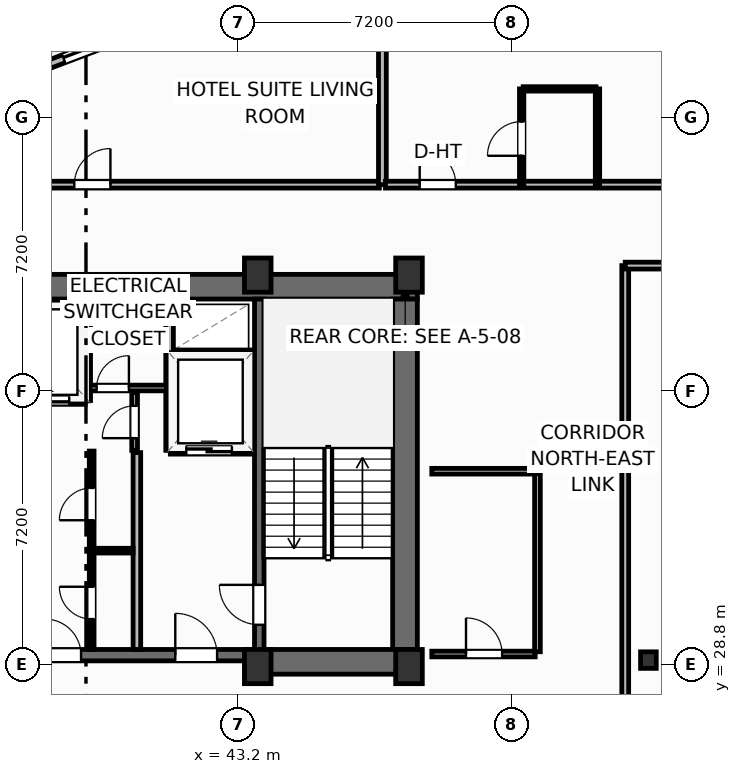
"""IFC4 building model, lengths in metres.
Left out: names, types, materials, properties, quantities, classifications, styles, units other than length and angle.
Written with IfcOpenShell. Run it as: python <this file> out.ifc"""

import sys

from ifc_helpers import new_model, si_unit, direction, frame, frame_2d, origin, origin_2d, place, context, subcontext, project, spatial, rectangle, i_section, extrude, element, fill, save


model = new_model("IFC4")
c1 = context("Model", 3, precision=1e-05, world=origin(), true_north=direction((0.0, 1.0)))
c2 = subcontext(c1, "Body", "Model", "MODEL_VIEW")
j1 = project(units=[si_unit("LENGTHUNIT", "METRE"), si_unit("PLANEANGLEUNIT", "RADIAN")], contexts=[c1])
p1 = place(None, origin())
s1 = spatial("IfcSite", under=j1, at=p1, CompositionType="ELEMENT")
p2 = place(p1, origin())
s2 = spatial("IfcBuilding", under=s1, at=p2, CompositionType="ELEMENT")
p3 = place(p2, frame((0.0, 0.0, 212.7)))
s3 = spatial("IfcBuildingStorey", under=s2, at=p3, CompositionType="ELEMENT", Elevation=212.7)
for number, where, z_axis, x_axis in (
    (1, (43.72, 28.75, 0.0), (0.0, 0.0, 1.0), (1.0, 0.0, 0.0)),
    (2, (47.7, 28.75, 0.0), (0.0, 0.0, 1.0), (1.0, 0.0, 0.0)),
    (3, (43.72, 39.05, 0.0), (0.0, 0.0, 1.0), (1.0, 0.0, 0.0)),
    (4, (47.7, 39.05, 0.0), (0.0, 0.0, 1.0), (1.0, 0.0, 0.0)),
):
    element("IfcColumn", number, at=place(p3, frame(where, z_axis=z_axis, x_axis=x_axis)), inside=s3, PredefinedType="COLUMN", context=c2, shape_type="SweptSolid", body=[
        extrude(rectangle(XDim=0.7, YDim=0.9, at=origin_2d()), origin(), (0.0, 0.0, 1.0), 3.7),
    ])
p4 = place(p3, frame((54.0, 28.92, 0.0), z_axis=(0.0, 0.0, 1.0), x_axis=(1.0, 0.0, 0.0)))
e5 = element("IfcColumn", 5, at=p4, inside=s3, PredefinedType="COLUMN", context=c2, shape_type="SweptSolid", body=[
    extrude(i_section(OverallWidth=0.412, OverallDepth=0.435, WebThickness=0.036, FlangeThickness=0.057, FilletRadius=0.025, at=origin_2d()), origin(), (0.0, 0.0, 1.0), 3.7),
])
p5 = place(p3, frame((30.48, 38.745, 0.0), z_axis=(0.0, 0.0, 1.0), x_axis=(1.0, 0.0, 0.0)))
e6 = element("IfcWall", 6, at=p5, inside=s3, PredefinedType="SHEAR", context=c2, shape_type="SweptSolid", body=[
    extrude(rectangle(XDim=17.44, YDim=0.65, at=frame_2d((8.72, 0.0))), origin(), (0.0, 0.0, 1.0), 3.45),
])
p6 = place(p3, frame((47.595, 29.2, 0.0), z_axis=(0.0, 0.0, 1.0), x_axis=(0.0, 1.0, 0.0)))
e7 = element("IfcWall", 7, at=p6, inside=s3, PredefinedType="SHEAR", context=c2, shape_type="SweptSolid", body=[
    extrude(rectangle(XDim=9.22, YDim=0.65, at=frame_2d((4.61, 0.0))), origin(), (0.0, 0.0, 1.0), 3.45),
])
p7 = place(p3, frame((43.6, 28.875, 0.0), z_axis=(0.0, 0.0, 1.0), x_axis=(1.0, 0.0, 0.0)))
e8 = element("IfcWall", 8, at=p7, inside=s3, PredefinedType="SHEAR", context=c2, shape_type="SweptSolid", body=[
    extrude(rectangle(XDim=4.32, YDim=0.65, at=frame_2d((2.16, 0.0))), origin(), (0.0, 0.0, 1.0), 3.45),
])
p8 = place(p3, frame((34.8, 29.05, 0.0), z_axis=(0.0, 0.0, 1.0), x_axis=(1.0, 0.0, 0.0)))
e9 = element("IfcWall", 9, at=p8, inside=s3, PredefinedType="SHEAR", context=c2, shape_type="SweptSolid", body=[
    extrude(rectangle(XDim=8.8, YDim=0.3, at=frame_2d((4.4, 0.0))), origin(), (0.0, 0.0, 1.0), 3.45),
])
p9 = place(p8, frame((0.95, 0.0, 0.0)))
e10 = element("IfcOpeningElement", 10, at=p9, cuts=e9, PredefinedType="OPENING", context=c2, shape_type="SweptSolid", body=[
    extrude(rectangle(XDim=1.1, YDim=2.15, at=frame_2d((0.55, 1.075))), frame((0.0, 0.16, 0.0), z_axis=(0.0, -1.0, 0.0), x_axis=(1.0, 0.0, 0.0)), (0.0, 0.0, 1.0), 0.32),
])
p10 = place(p8, frame((6.75, 0.0, 0.0)))
e11 = element("IfcOpeningElement", 11, at=p10, cuts=e9, PredefinedType="OPENING", context=c2, shape_type="SweptSolid", body=[
    extrude(rectangle(XDim=1.1, YDim=2.15, at=frame_2d((0.55, 1.075))), frame((0.0, 0.16, 0.0), z_axis=(0.0, -1.0, 0.0), x_axis=(1.0, 0.0, 0.0)), (0.0, 0.0, 1.0), 0.32),
])
p11 = place(p8, frame((3.32, 0.0, 0.0)))
e12 = element("IfcOpeningElement", 12, at=p11, cuts=e9, PredefinedType="OPENING", context=c2, shape_type="SweptSolid", body=[
    extrude(rectangle(XDim=0.95, YDim=2.15, at=frame_2d((0.475, 1.075))), frame((0.0, 0.16, 0.0), z_axis=(0.0, -1.0, 0.0), x_axis=(1.0, 0.0, 0.0)), (0.0, 0.0, 1.0), 0.32),
])
p12 = place(p3, frame((43.76, 29.2, 0.0), z_axis=(0.0, 0.0, 1.0), x_axis=(0.0, 1.0, 0.0)))
e13 = element("IfcWall", 13, at=p12, inside=s3, PredefinedType="SHEAR", context=c2, shape_type="SweptSolid", body=[
    extrude(rectangle(XDim=9.22, YDim=0.25, at=frame_2d((4.61, 0.0))), origin(), (0.0, 0.0, 1.0), 3.45),
])
p13 = place(p12, frame((0.65, 0.0, 0.0)))
e14 = element("IfcOpeningElement", 14, at=p13, cuts=e13, PredefinedType="OPENING", context=c2, shape_type="SweptSolid", body=[
    extrude(rectangle(XDim=1.05, YDim=2.15, at=frame_2d((0.525, 1.075))), frame((0.0, 0.135, 0.0), z_axis=(0.0, -1.0, 0.0), x_axis=(1.0, 0.0, 0.0)), (0.0, 0.0, 1.0), 0.27),
])
p14 = place(p3, frame((36.617, 43.986, 0.0), z_axis=(0.0, 0.0, 1.0), x_axis=(0.935227640088, 0.354046976001, 0.0)))
e15 = element("IfcWall", 15, at=p14, inside=s3, PredefinedType="SOLIDWALL", context=c2, shape_type="SweptSolid", body=[
    extrude(rectangle(XDim=6.0, YDim=0.22, at=frame_2d((3.0, 0.0))), origin(), (0.0, 0.0, 1.0), 2.73),
])
p15 = place(p14, frame((2.136, 0.0, 0.0)))
e16 = element("IfcOpeningElement", 16, at=p15, cuts=e15, PredefinedType="OPENING", context=c2, shape_type="SweptSolid", body=[
    extrude(rectangle(XDim=2.1, YDim=2.3, at=frame_2d((1.05, 1.15))), frame((0.0, 0.12, 0.0), z_axis=(0.0, -1.0, 0.0), x_axis=(1.0, 0.0, 0.0)), (0.0, 0.0, 1.0), 0.24),
])
p16 = place(p3, frame((35.58, 41.43, 0.0), z_axis=(0.0, 0.0, 1.0), x_axis=(1.0, 0.0, 0.0)))
e17 = element("IfcWall", 17, at=p16, inside=s3, PredefinedType="PARTITIONING", context=c2, shape_type="SweptSolid", body=[
    extrude(rectangle(XDim=11.34, YDim=0.18, at=frame_2d((5.67, 0.0))), origin(), (0.0, 0.0, 1.0), 3.018),
])
p17 = place(p16, frame((3.313, 0.0, 0.0)))
e18 = element("IfcOpeningElement", 18, at=p17, cuts=e17, PredefinedType="OPENING", context=c2, shape_type="SweptSolid", body=[
    extrude(rectangle(XDim=0.95, YDim=2.15, at=frame_2d((0.475, 1.075))), frame((0.0, 0.1, 0.0), z_axis=(0.0, -1.0, 0.0), x_axis=(1.0, 0.0, 0.0)), (0.0, 0.0, 1.0), 0.2),
])
p18 = place(p3, frame((47.0, 41.43, 0.0), z_axis=(0.0, 0.0, 1.0), x_axis=(0.0, 1.0, 0.0)))
e19 = element("IfcWall", 19, at=p18, inside=s3, PredefinedType="PARTITIONING", context=c2, shape_type="SweptSolid", body=[
    extrude(rectangle(XDim=8.7, YDim=0.205, at=frame_2d((4.35, 0.0))), origin(), (0.0, 0.0, 1.0), 3.45),
])
p19 = place(p3, frame((47.08, 41.43, 0.0), z_axis=(0.0, 0.0, 1.0), x_axis=(1.0, 0.0, 0.0)))
e20 = element("IfcWall", 20, at=p19, inside=s3, PredefinedType="PARTITIONING", context=c2, shape_type="SweptSolid", body=[
    extrude(rectangle(XDim=21.216, YDim=0.18, at=frame_2d((10.608, 0.0))), origin(), (0.0, 0.0, 1.0), 3.45),
])
p20 = place(p19, frame((0.902, 0.0, 0.0)))
e21 = element("IfcOpeningElement", 21, at=p20, cuts=e20, PredefinedType="OPENING", context=c2, shape_type="SweptSolid", body=[
    extrude(rectangle(XDim=0.95, YDim=2.15, at=frame_2d((0.475, 1.075))), frame((0.0, 0.1, 0.0), z_axis=(0.0, -1.0, 0.0), x_axis=(1.0, 0.0, 0.0)), (0.0, 0.0, 1.0), 0.2),
])
p21 = place(p3, frame((50.705, 43.95, 0.0), z_axis=(0.0, 0.0, 1.0), x_axis=(1.0, 0.0, 0.0)))
e22 = element("IfcWall", 22, at=p21, inside=s3, PredefinedType="PARTITIONING", context=c2, shape_type="SweptSolid", body=[
    extrude(rectangle(XDim=1.915, YDim=0.115, at=frame_2d((0.958, 0.0))), origin(), (0.0, 0.0, 1.0), 3.45),
])
p22 = place(p3, frame((50.665, 41.43, 0.0), z_axis=(0.0, 0.0, 1.0), x_axis=(0.0, 1.0, 0.0)))
e23 = element("IfcWall", 23, at=p22, inside=s3, PredefinedType="PARTITIONING", context=c2, shape_type="SweptSolid", body=[
    extrude(rectangle(XDim=2.52, YDim=0.115, at=frame_2d((1.26, 0.0))), origin(), (0.0, 0.0, 1.0), 3.45),
])
p23 = place(p22, frame((0.76, 0.0, 0.0)))
e24 = element("IfcOpeningElement", 24, at=p23, cuts=e23, PredefinedType="OPENING", context=c2, shape_type="SweptSolid", body=[
    extrude(rectangle(XDim=0.9, YDim=2.05, at=frame_2d((0.45, 1.025))), frame((0.0, 0.067, 0.0), z_axis=(0.0, -1.0, 0.0), x_axis=(1.0, 0.0, 0.0)), (0.0, 0.0, 1.0), 0.135),
])
p24 = place(p3, frame((52.66, 41.43, 0.0), z_axis=(0.0, 0.0, 1.0), x_axis=(0.0, 1.0, 0.0)))
e25 = element("IfcWall", 25, at=p24, inside=s3, PredefinedType="PARTITIONING", context=c2, shape_type="SweptSolid", body=[
    extrude(rectangle(XDim=2.52, YDim=0.115, at=frame_2d((1.26, 0.0))), origin(), (0.0, 0.0, 1.0), 3.45),
])
p25 = place(p3, frame((53.39, 19.24, 0.0), z_axis=(0.0, 0.0, 1.0), x_axis=(0.0, 1.0, 0.0)))
e26 = element("IfcWall", 26, at=p25, inside=s3, PredefinedType="PARTITIONING", context=c2, shape_type="SweptSolid", body=[
    extrude(rectangle(XDim=20.06, YDim=0.18, at=frame_2d((10.03, 0.0))), origin(), (0.0, 0.0, 1.0), 3.45),
])
p26 = place(p25, frame((7.7, 0.0, 0.0)))
e27 = element("IfcOpeningElement", 27, at=p26, cuts=e26, PredefinedType="OPENING", context=c2, shape_type="SweptSolid", body=[
    extrude(rectangle(XDim=0.95, YDim=2.05, at=frame_2d((0.475, 1.025))), frame((0.0, 0.1, 0.0), z_axis=(0.0, -1.0, 0.0), x_axis=(1.0, 0.0, 0.0)), (0.0, 0.0, 1.0), 0.2),
])
p27 = place(p3, frame((53.39, 39.3, 0.0), z_axis=(0.0, 0.0, 1.0), x_axis=(1.0, 0.0, 0.0)))
e28 = element("IfcWall", 28, at=p27, inside=s3, PredefinedType="PARTITIONING", context=c2, shape_type="SweptSolid", body=[
    extrude(rectangle(XDim=15.713, YDim=0.18, at=frame_2d((7.856, 0.0))), origin(), (0.0, 0.0, 1.0), 3.45),
])
p28 = place(p3, frame((40.54, 29.2, 0.0), z_axis=(0.0, 0.0, 1.0), x_axis=(0.0, 1.0, 0.0)))
e29 = element("IfcWall", 29, at=p28, inside=s3, PredefinedType="PARTITIONING", context=c2, shape_type="SweptSolid", body=[
    extrude(rectangle(XDim=5.18, YDim=0.2, at=frame_2d((2.59, 0.0))), origin(), (0.0, 0.0, 1.0), 3.45),
])
p29 = place(p3, frame((41.42, 34.44, 0.0), z_axis=(0.0, 0.0, 1.0), x_axis=(1.0, 0.0, 0.0)))
e30 = element("IfcWall", 30, at=p29, inside=s3, PredefinedType="PARTITIONING", context=c2, shape_type="SweptSolid", body=[
    extrude(rectangle(XDim=2.18, YDim=0.2, at=frame_2d((1.09, 0.0))), origin(), (0.0, 0.0, 1.0), 3.45),
])
p30 = place(p29, frame((0.42, 0.0, 0.0)))
e31 = element("IfcOpeningElement", 31, at=p30, cuts=e30, PredefinedType="OPENING", context=c2, shape_type="SweptSolid", body=[
    extrude(rectangle(XDim=1.2, YDim=2.2, at=frame_2d((0.6, 1.1))), frame((0.0, 0.11, 0.0), z_axis=(0.0, -1.0, 0.0), x_axis=(1.0, 0.0, 0.0)), (0.0, 0.0, 1.0), 0.22),
])
p31 = place(p3, frame((41.42, 36.98, 0.0), z_axis=(0.0, 0.0, 1.0), x_axis=(1.0, 0.0, 0.0)))
e32 = element("IfcWall", 32, at=p31, inside=s3, PredefinedType="PARTITIONING", context=c2, shape_type="SweptSolid", body=[
    extrude(rectangle(XDim=2.18, YDim=0.2, at=frame_2d((1.09, 0.0))), origin(), (0.0, 0.0, 1.0), 3.45),
])
p32 = place(p3, frame((41.4, 34.44, 0.0), z_axis=(0.0, 0.0, 1.0), x_axis=(0.0, 1.0, 0.0)))
e33 = element("IfcWall", 33, at=p32, inside=s3, PredefinedType="PARTITIONING", context=c2, shape_type="SweptSolid", body=[
    extrude(rectangle(XDim=3.9, YDim=0.2, at=frame_2d((1.95, 0.0))), origin(), (0.0, 0.0, 1.0), 3.45),
])
p33 = place(p3, frame((37.06, 35.75, 0.0), z_axis=(0.0, 0.0, 1.0), x_axis=(1.0, 0.0, 0.0)))
e34 = element("IfcWall", 34, at=p33, inside=s3, PredefinedType="PARTITIONING", context=c2, shape_type="SweptSolid", body=[
    extrude(rectangle(XDim=2.12, YDim=0.2, at=frame_2d((1.06, 0.0))), origin(), (0.0, 0.0, 1.0), 3.45),
])
p34 = place(p33, frame((0.4, 0.0, 0.0)))
e35 = element("IfcOpeningElement", 35, at=p34, cuts=e34, PredefinedType="OPENING", context=c2, shape_type="SweptSolid", body=[
    extrude(rectangle(XDim=1.3, YDim=2.2, at=frame_2d((0.65, 1.1))), frame((0.0, 0.11, 0.0), z_axis=(0.0, -1.0, 0.0), x_axis=(1.0, 0.0, 0.0)), (0.0, 0.0, 1.0), 0.22),
])
p35 = place(p3, frame((39.22, 35.75, 0.0), z_axis=(0.0, 0.0, 1.0), x_axis=(0.0, 1.0, 0.0)))
e36 = element("IfcWall", 36, at=p35, inside=s3, PredefinedType="PARTITIONING", context=c2, shape_type="SweptSolid", body=[
    extrude(rectangle(XDim=2.59, YDim=0.2, at=frame_2d((1.295, 0.0))), origin(), (0.0, 0.0, 1.0), 3.45),
])
p36 = place(p3, frame((39.3, 36.08, 0.0), z_axis=(0.0, 0.0, 1.0), x_axis=(1.0, 0.0, 0.0)))
e37 = element("IfcWall", 37, at=p36, inside=s3, PredefinedType="PARTITIONING", context=c2, shape_type="SweptSolid", body=[
    extrude(rectangle(XDim=2.02, YDim=0.15, at=frame_2d((1.01, 0.0))), origin(), (0.0, 0.0, 1.0), 3.45),
])
p37 = place(p36, frame((0.18, 0.0, 0.0)))
e38 = element("IfcOpeningElement", 38, at=p37, cuts=e37, PredefinedType="OPENING", context=c2, shape_type="SweptSolid", body=[
    extrude(rectangle(XDim=0.85, YDim=2.05, at=frame_2d((0.425, 1.025))), frame((0.0, 0.085, 0.0), z_axis=(0.0, -1.0, 0.0), x_axis=(1.0, 0.0, 0.0)), (0.0, 0.0, 1.0), 0.17),
])
p38 = place(p3, frame((40.48, 34.44, 0.0), z_axis=(0.0, 0.0, 1.0), x_axis=(0.0, 1.0, 0.0)))
e39 = element("IfcWall", 39, at=p38, inside=s3, PredefinedType="PARTITIONING", context=c2, shape_type="SweptSolid", body=[
    extrude(rectangle(XDim=1.52, YDim=0.15, at=frame_2d((0.76, 0.0))), origin(), (0.0, 0.0, 1.0), 3.45),
])
p39 = place(p38, frame((0.32, 0.0, 0.0)))
e40 = element("IfcOpeningElement", 40, at=p39, cuts=e39, PredefinedType="OPENING", context=c2, shape_type="SweptSolid", body=[
    extrude(rectangle(XDim=0.85, YDim=2.05, at=frame_2d((0.425, 1.025))), frame((0.0, 0.085, 0.0), z_axis=(0.0, -1.0, 0.0), x_axis=(1.0, 0.0, 0.0)), (0.0, 0.0, 1.0), 0.17),
])
p40 = place(p3, frame((39.35, 31.8, 0.0), z_axis=(0.0, 0.0, 1.0), x_axis=(1.0, 0.0, 0.0)))
e41 = element("IfcWall", 41, at=p40, inside=s3, PredefinedType="PARTITIONING", context=c2, shape_type="SweptSolid", body=[
    extrude(rectangle(XDim=1.09, YDim=0.125, at=frame_2d((0.545, 0.0))), origin(), (0.0, 0.0, 1.0), 3.45),
])
p41 = place(p3, frame((39.35, 29.2, 0.0), z_axis=(0.0, 0.0, 1.0), x_axis=(0.0, 1.0, 0.0)))
e42 = element("IfcWall", 42, at=p41, inside=s3, PredefinedType="PARTITIONING", context=c2, shape_type="SweptSolid", body=[
    extrude(rectangle(XDim=5.22, YDim=0.125, at=frame_2d((2.61, 0.0))), origin(), (0.0, 0.0, 1.0), 3.45),
])
p42 = place(p41, frame((0.8, 0.0, 0.0)))
e43 = element("IfcOpeningElement", 43, at=p42, cuts=e42, PredefinedType="OPENING", context=c2, shape_type="SweptSolid", body=[
    extrude(rectangle(XDim=0.85, YDim=2.05, at=frame_2d((0.425, 1.025))), frame((0.0, 0.073, 0.0), z_axis=(0.0, -1.0, 0.0), x_axis=(1.0, 0.0, 0.0)), (0.0, 0.0, 1.0), 0.145),
])
p43 = place(p41, frame((3.4, 0.0, 0.0)))
e44 = element("IfcOpeningElement", 44, at=p43, cuts=e42, PredefinedType="OPENING", context=c2, shape_type="SweptSolid", body=[
    extrude(rectangle(XDim=0.85, YDim=2.05, at=frame_2d((0.425, 1.025))), frame((0.0, 0.073, 0.0), z_axis=(0.0, -1.0, 0.0), x_axis=(1.0, 0.0, 0.0)), (0.0, 0.0, 1.0), 0.145),
])
p44 = place(p3, frame((48.3, 29.08, 0.0), z_axis=(0.0, 0.0, 1.0), x_axis=(1.0, 0.0, 0.0)))
e45 = element("IfcWall", 45, at=p44, inside=s3, PredefinedType="PARTITIONING", context=c2, shape_type="SweptSolid", body=[
    extrude(rectangle(XDim=2.72, YDim=0.15, at=frame_2d((1.36, 0.0))), origin(), (0.0, 0.0, 1.0), 2.662),
])
p45 = place(p44, frame((0.9, 0.0, 0.0)))
e46 = element("IfcOpeningElement", 46, at=p45, cuts=e45, PredefinedType="OPENING", context=c2, shape_type="SweptSolid", body=[
    extrude(rectangle(XDim=0.95, YDim=2.05, at=frame_2d((0.475, 1.025))), frame((0.0, 0.085, 0.0), z_axis=(0.0, -1.0, 0.0), x_axis=(1.0, 0.0, 0.0)), (0.0, 0.0, 1.0), 0.17),
])
p46 = place(p3, frame((48.3, 33.89, 0.0), z_axis=(0.0, 0.0, 1.0), x_axis=(1.0, 0.0, 0.0)))
e47 = element("IfcWall", 47, at=p46, inside=s3, PredefinedType="PARTITIONING", context=c2, shape_type="SweptSolid", body=[
    extrude(rectangle(XDim=2.72, YDim=0.15, at=frame_2d((1.36, 0.0))), origin(), (0.0, 0.0, 1.0), 3.45),
])
p47 = place(p3, frame((51.08, 29.14, 0.0), z_axis=(0.0, 0.0, 1.0), x_axis=(0.0, 1.0, 0.0)))
e48 = element("IfcWall", 48, at=p47, inside=s3, PredefinedType="PARTITIONING", context=c2, shape_type="SweptSolid", body=[
    extrude(rectangle(XDim=4.69, YDim=0.15, at=frame_2d((2.345, 0.0))), origin(), (0.0, 0.0, 1.0), 3.45),
])
p48 = place(p15, origin())
e49 = element("IfcDoor", 49, at=p48, inside=s3, OperationType="SLIDING_TO_LEFT", PredefinedType="DOOR", context=c2, shape_type="SweptSolid", body=[
    extrude(rectangle(XDim=2.1, YDim=2.3, at=frame_2d((1.05, 1.15))), frame((0.0, 0.025, 0.0), z_axis=(0.0, -1.0, 0.0), x_axis=(1.0, 0.0, 0.0)), (0.0, 0.0, 1.0), 0.05),
])
fill(e16, e49)
p49 = place(p17, origin())
e50 = element("IfcDoor", 50, at=p49, inside=s3, OperationType="SINGLE_SWING_RIGHT", PredefinedType="DOOR", context=c2, shape_type="SweptSolid", body=[
    extrude(rectangle(XDim=0.95, YDim=2.15, at=frame_2d((0.475, 1.075))), frame((0.0, 0.025, 0.0), z_axis=(0.0, -1.0, 0.0), x_axis=(1.0, 0.0, 0.0)), (0.0, 0.0, 1.0), 0.05),
])
fill(e18, e50)
p50 = place(p20, origin())
e51 = element("IfcDoor", 51, at=p50, inside=s3, OperationType="SINGLE_SWING_LEFT", PredefinedType="DOOR", context=c2, shape_type="SweptSolid", body=[
    extrude(rectangle(XDim=0.95, YDim=2.15, at=frame_2d((0.475, 1.075))), frame((0.0, 0.025, 0.0), z_axis=(0.0, -1.0, 0.0), x_axis=(1.0, 0.0, 0.0)), (0.0, 0.0, 1.0), 0.05),
])
fill(e21, e51)
p51 = place(p23, origin())
e52 = element("IfcDoor", 52, at=p51, inside=s3, OperationType="SINGLE_SWING_LEFT", PredefinedType="DOOR", context=c2, shape_type="SweptSolid", body=[
    extrude(rectangle(XDim=0.9, YDim=2.05, at=frame_2d((0.45, 1.025))), frame((0.0, 0.025, 0.0), z_axis=(0.0, -1.0, 0.0), x_axis=(1.0, 0.0, 0.0)), (0.0, 0.0, 1.0), 0.05),
])
fill(e24, e52)
p52 = place(p13, origin())
e53 = element("IfcDoor", 53, at=p52, inside=s3, OperationType="SINGLE_SWING_RIGHT", PredefinedType="DOOR", context=c2, shape_type="SweptSolid", body=[
    extrude(rectangle(XDim=1.05, YDim=2.15, at=frame_2d((0.525, 1.075))), frame((0.0, 0.025, 0.0), z_axis=(0.0, -1.0, 0.0), x_axis=(1.0, 0.0, 0.0)), (0.0, 0.0, 1.0), 0.05),
])
fill(e14, e53)
p53 = place(p10, origin())
e54 = element("IfcDoor", 54, at=p53, inside=s3, OperationType="SINGLE_SWING_LEFT", PredefinedType="DOOR", context=c2, shape_type="SweptSolid", body=[
    extrude(rectangle(XDim=1.1, YDim=2.15, at=frame_2d((0.55, 1.075))), frame((0.0, 0.025, 0.0), z_axis=(0.0, -1.0, 0.0), x_axis=(1.0, 0.0, 0.0)), (0.0, 0.0, 1.0), 0.05),
])
fill(e11, e54)
p54 = place(p30, origin())
e55 = element("IfcDoor", 55, at=p54, inside=s3, OperationType="SLIDING_TO_LEFT", PredefinedType="DOOR", context=c2, shape_type="SweptSolid", body=[
    extrude(rectangle(XDim=1.2, YDim=2.2, at=frame_2d((0.6, 1.1))), frame((0.0, 0.025, 0.0), z_axis=(0.0, -1.0, 0.0), x_axis=(1.0, 0.0, 0.0)), (0.0, 0.0, 1.0), 0.05),
])
fill(e31, e55)
p55 = place(p34, origin())
e56 = element("IfcDoor", 56, at=p55, inside=s3, OperationType="SLIDING_TO_LEFT", PredefinedType="DOOR", context=c2, shape_type="SweptSolid", body=[
    extrude(rectangle(XDim=1.3, YDim=2.2, at=frame_2d((0.65, 1.1))), frame((0.0, 0.025, 0.0), z_axis=(0.0, -1.0, 0.0), x_axis=(1.0, 0.0, 0.0)), (0.0, 0.0, 1.0), 0.05),
])
fill(e35, e56)
p56 = place(p37, origin())
e57 = element("IfcDoor", 57, at=p56, inside=s3, OperationType="SINGLE_SWING_RIGHT", PredefinedType="DOOR", context=c2, shape_type="SweptSolid", body=[
    extrude(rectangle(XDim=0.85, YDim=2.05, at=frame_2d((0.425, 1.025))), frame((0.0, 0.025, 0.0), z_axis=(0.0, -1.0, 0.0), x_axis=(1.0, 0.0, 0.0)), (0.0, 0.0, 1.0), 0.05),
])
fill(e38, e57)
p57 = place(p39, origin())
e58 = element("IfcDoor", 58, at=p57, inside=s3, OperationType="SINGLE_SWING_LEFT", PredefinedType="DOOR", context=c2, shape_type="SweptSolid", body=[
    extrude(rectangle(XDim=0.85, YDim=2.05, at=frame_2d((0.425, 1.025))), frame((0.0, 0.025, 0.0), z_axis=(0.0, -1.0, 0.0), x_axis=(1.0, 0.0, 0.0)), (0.0, 0.0, 1.0), 0.05),
])
fill(e40, e58)
p58 = place(p42, origin())
e59 = element("IfcDoor", 59, at=p58, inside=s3, OperationType="SINGLE_SWING_RIGHT", PredefinedType="DOOR", context=c2, shape_type="SweptSolid", body=[
    extrude(rectangle(XDim=0.85, YDim=2.05, at=frame_2d((0.425, 1.025))), frame((0.0, 0.025, 0.0), z_axis=(0.0, -1.0, 0.0), x_axis=(1.0, 0.0, 0.0)), (0.0, 0.0, 1.0), 0.05),
])
fill(e43, e59)
p59 = place(p43, origin())
e60 = element("IfcDoor", 60, at=p59, inside=s3, OperationType="SINGLE_SWING_LEFT", PredefinedType="DOOR", context=c2, shape_type="SweptSolid", body=[
    extrude(rectangle(XDim=0.85, YDim=2.05, at=frame_2d((0.425, 1.025))), frame((0.0, 0.025, 0.0), z_axis=(0.0, -1.0, 0.0), x_axis=(1.0, 0.0, 0.0)), (0.0, 0.0, 1.0), 0.05),
])
fill(e44, e60)
p60 = place(p11, origin())
e61 = element("IfcDoor", 61, at=p60, inside=s3, OperationType="SINGLE_SWING_LEFT", PredefinedType="DOOR", context=c2, shape_type="SweptSolid", body=[
    extrude(rectangle(XDim=0.95, YDim=2.15, at=frame_2d((0.475, 1.075))), frame((0.0, 0.025, 0.0), z_axis=(0.0, -1.0, 0.0), x_axis=(1.0, 0.0, 0.0)), (0.0, 0.0, 1.0), 0.05),
])
fill(e12, e61)
p61 = place(p45, origin())
e62 = element("IfcDoor", 62, at=p61, inside=s3, OperationType="SINGLE_SWING_LEFT", PredefinedType="DOOR", context=c2, shape_type="SweptSolid", body=[
    extrude(rectangle(XDim=0.95, YDim=2.05, at=frame_2d((0.475, 1.025))), frame((0.0, 0.025, 0.0), z_axis=(0.0, -1.0, 0.0), x_axis=(1.0, 0.0, 0.0)), (0.0, 0.0, 1.0), 0.05),
])
fill(e46, e62)
save(model, sys.argv[1])
